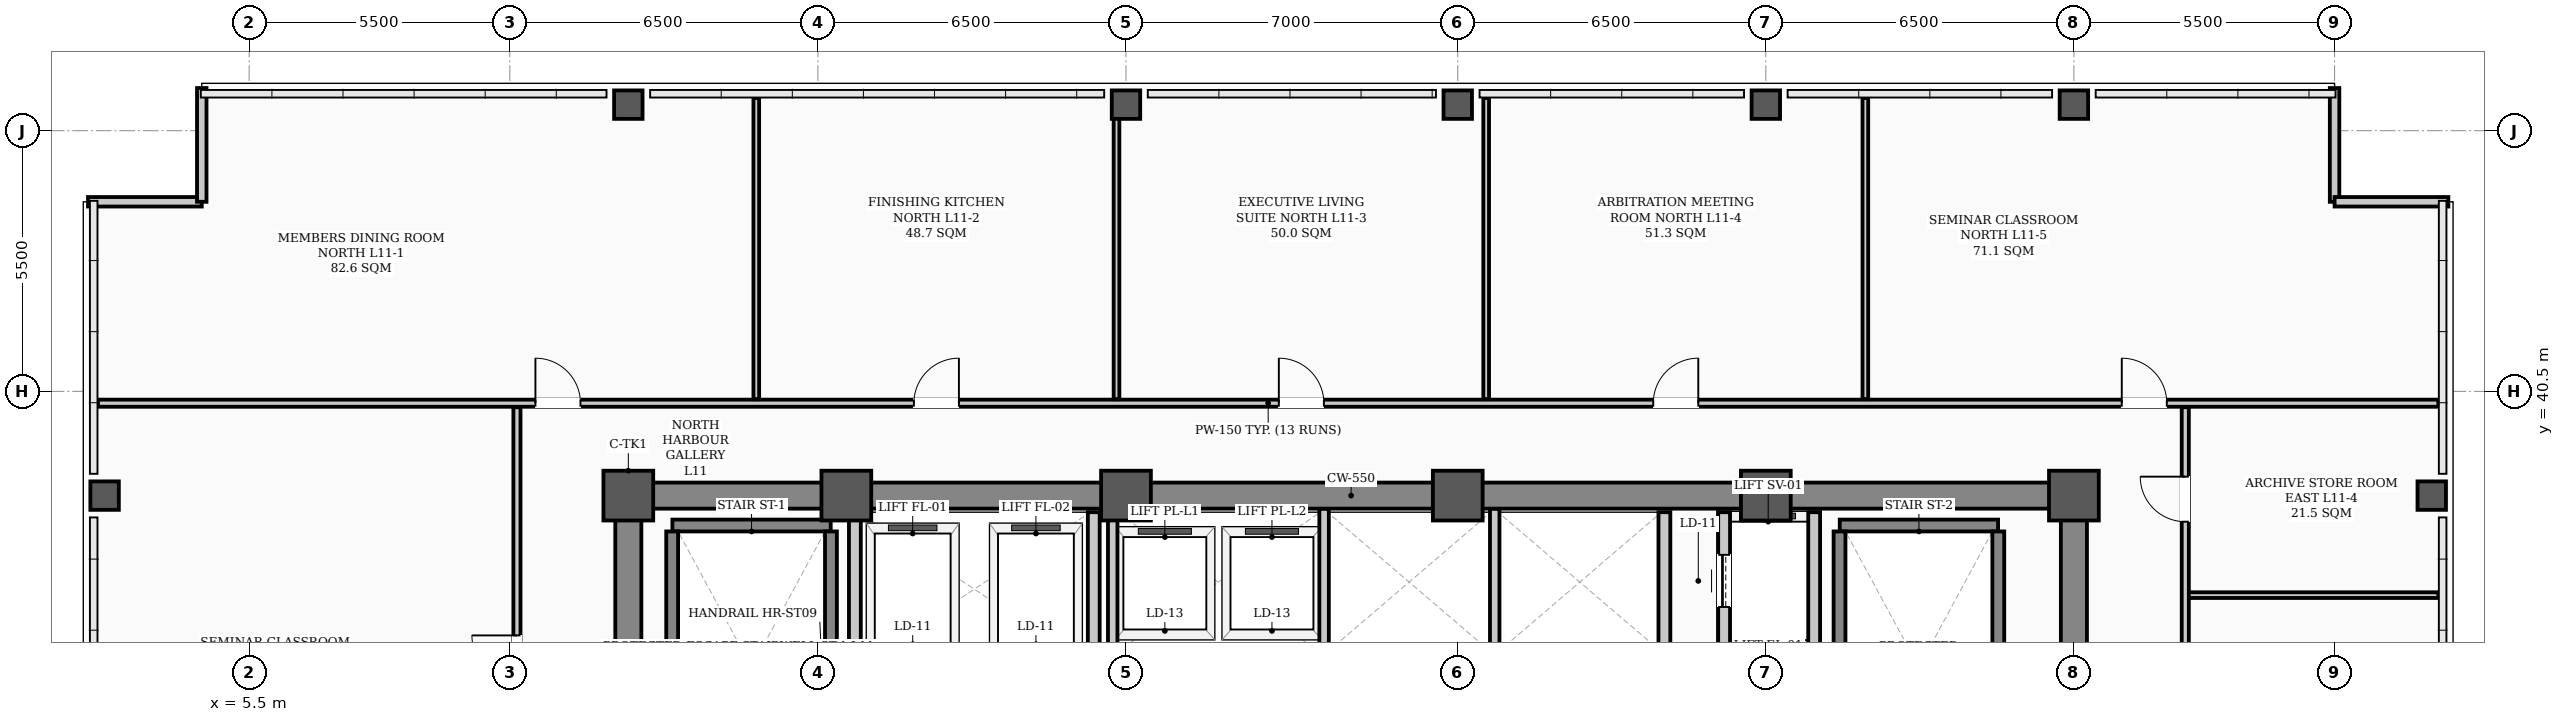
"""IFC4 building model, lengths in metres.
Left out: names, types, materials, properties, quantities, classifications, styles, units other than length and angle.
Written with IfcOpenShell. Run it as: python <this file> out.ifc"""

import sys

from ifc_helpers import new_model, si_unit, direction, frame, frame_2d, origin, origin_2d, place, context, subcontext, project, spatial, rectangle, hollow_rectangle, extrude, element, fill, save


model = new_model("IFC4")
c1 = context("Model", 3, precision=1e-05, world=origin(), true_north=direction((0.0, 1.0)))
c2 = subcontext(c1, "Body", "Model", "MODEL_VIEW")
j1 = project(units=[si_unit("LENGTHUNIT", "METRE"), si_unit("PLANEANGLEUNIT", "RADIAN")], contexts=[c1])
p1 = place(None, origin())
s1 = spatial("IfcSite", under=j1, at=p1, CompositionType="ELEMENT")
p2 = place(p1, origin())
s2 = spatial("IfcBuilding", under=s1, at=p2, CompositionType="ELEMENT")
p3 = place(p2, frame((0.0, 0.0, 46.0)))
s3 = spatial("IfcBuildingStorey", under=s2, at=p3, CompositionType="ELEMENT", Elevation=46.0)
for number, where, z_axis, x_axis in (
    (1, (13.5, 38.3, 0.0), (0.0, 0.0, 1.0), (1.0, 0.0, 0.0)),
    (2, (18.1, 38.3, 0.0), (0.0, 0.0, 1.0), (1.0, 0.0, 0.0)),
    (3, (24.0, 38.3, 0.0), (0.0, 0.0, 1.0), (1.0, 0.0, 0.0)),
    (4, (31.0, 38.3, 0.0), (0.0, 0.0, 1.0), (1.0, 0.0, 0.0)),
    (5, (37.5, 38.3, 0.0), (0.0, 0.0, 1.0), (1.0, 0.0, 0.0)),
    (6, (44.0, 38.3, 0.0), (0.0, 0.0, 1.0), (1.0, 0.0, 0.0)),
):
    element("IfcColumn", number, at=place(p3, frame(where, z_axis=z_axis, x_axis=x_axis)), inside=s3, PredefinedType="COLUMN", context=c2, shape_type="SweptSolid", body=[
        extrude(hollow_rectangle(XDim=1.05, YDim=1.05, WallThickness=0.038, InnerFilletRadius=0.019, OuterFilletRadius=0.057, at=origin_2d()), origin(), (0.0, 0.0, 1.0), 3.9),
    ])
for number, where, z_axis, x_axis in (
    (7, (2.45, 38.3, 0.0), (0.0, 0.0, 1.0), (1.0, 0.0, 0.0)),
    (8, (13.5, 46.55, 0.0), (0.0, 0.0, 1.0), (1.0, 0.0, 0.0)),
    (9, (24.0, 46.55, 0.0), (0.0, 0.0, 1.0), (1.0, 0.0, 0.0)),
    (10, (31.0, 46.55, 0.0), (0.0, 0.0, 1.0), (1.0, 0.0, 0.0)),
    (11, (37.5, 46.55, 0.0), (0.0, 0.0, 1.0), (1.0, 0.0, 0.0)),
    (12, (44.0, 46.55, 0.0), (0.0, 0.0, 1.0), (1.0, 0.0, 0.0)),
    (13, (51.55, 38.3, 0.0), (0.0, 0.0, 1.0), (1.0, 0.0, 0.0)),
):
    element("IfcColumn", number, at=place(p3, frame(where, z_axis=z_axis, x_axis=x_axis)), inside=s3, PredefinedType="COLUMN", context=c2, shape_type="SweptSolid", body=[
        extrude(hollow_rectangle(XDim=0.6, YDim=0.6, WallThickness=0.026, InnerFilletRadius=0.013, OuterFilletRadius=0.039, at=origin_2d()), origin(), (0.0, 0.0, 1.0), 3.9),
    ])
for number, where, z_axis, x_axis in (
    (14, (2.1, 44.5, 0.0), (0.0, 0.0, 1.0), (1.0, 0.0, 0.0)),
    (15, (4.5, 44.5, 0.0), (0.0, 0.0, 1.0), (0.0, 1.0, 0.0)),
    (16, (49.5, 46.9, 0.0), (0.0, 0.0, 1.0), (0.0, -1.0, 0.0)),
    (17, (49.5, 44.5, 0.0), (0.0, 0.0, 1.0), (1.0, 0.0, 0.0)),
):
    element("IfcWall", number, at=place(p3, frame(where, z_axis=z_axis, x_axis=x_axis)), inside=s3, PredefinedType="PARAPET", context=c2, shape_type="SweptSolid", body=[
        extrude(rectangle(XDim=2.4, YDim=0.2, at=frame_2d((1.2, 0.0))), origin(), (0.0, 0.0, 1.0), 1.2),
    ])
p4 = place(p3, frame((13.5, 38.3, 0.0), z_axis=(0.0, 0.0, 1.0), x_axis=(1.0, 0.0, 0.0)))
e18 = element("IfcWall", 18, at=p4, inside=s3, PredefinedType="SHEAR", context=c2, shape_type="SweptSolid", body=[
    extrude(rectangle(XDim=30.5, YDim=0.55, at=frame_2d((15.25, 0.0))), origin(), (0.0, 0.0, 1.0), 3.72),
])
for number, where, z_axis, x_axis in (
    (19, (13.5, 29.35, 0.0), (0.0, 0.0, 1.0), (0.0, 1.0, 0.0)),
    (20, (44.0, 29.35, 0.0), (0.0, 0.0, 1.0), (0.0, 1.0, 0.0)),
):
    element("IfcWall", number, at=place(p3, frame(where, z_axis=z_axis, x_axis=x_axis)), inside=s3, PredefinedType="SHEAR", context=c2, shape_type="SweptSolid", body=[
        extrude(rectangle(XDim=8.6, YDim=0.55, at=frame_2d((4.3, 0.0))), origin(), (0.0, 0.0, 1.0), 3.72),
    ])
p5 = place(p3, frame((14.43, 37.669, 0.0), z_axis=(0.0, 0.0, 1.0), x_axis=(1.0, 0.0, 0.0)))
e21 = element("IfcWall", 21, at=p5, inside=s3, PredefinedType="STANDARD", context=c2, shape_type="SweptSolid", body=[
    extrude(rectangle(XDim=3.34, YDim=0.25, at=frame_2d((1.67, 0.0))), origin(), (0.0, 0.0, 1.0), 3.72),
])
for number, where, z_axis, x_axis in (
    (22, (14.425, 30.36, 0.0), (0.0, 0.0, 1.0), (0.0, 1.0, 0.0)),
    (23, (17.775, 30.36, 0.0), (0.0, 0.0, 1.0), (0.0, 1.0, 0.0)),
):
    element("IfcWall", number, at=place(p3, frame(where, z_axis=z_axis, x_axis=x_axis)), inside=s3, PredefinedType="STANDARD", context=c2, shape_type="SweptSolid", body=[
        extrude(rectangle(XDim=7.184, YDim=0.25, at=frame_2d((3.592, 0.0))), origin(), (0.0, 0.0, 1.0), 3.72),
    ])
p6 = place(p3, frame((39.06, 37.669, 0.0), z_axis=(0.0, 0.0, 1.0), x_axis=(1.0, 0.0, 0.0)))
e24 = element("IfcWall", 24, at=p6, inside=s3, PredefinedType="STANDARD", context=c2, shape_type="SweptSolid", body=[
    extrude(rectangle(XDim=3.34, YDim=0.25, at=frame_2d((1.67, 0.0))), origin(), (0.0, 0.0, 1.0), 3.72),
])
for number, where, z_axis, x_axis in (
    (25, (39.055, 30.36, 0.0), (0.0, 0.0, 1.0), (0.0, 1.0, 0.0)),
    (26, (42.405, 30.36, 0.0), (0.0, 0.0, 1.0), (0.0, 1.0, 0.0)),
):
    element("IfcWall", number, at=place(p3, frame(where, z_axis=z_axis, x_axis=x_axis)), inside=s3, PredefinedType="STANDARD", context=c2, shape_type="SweptSolid", body=[
        extrude(rectangle(XDim=7.184, YDim=0.25, at=frame_2d((3.592, 0.0))), origin(), (0.0, 0.0, 1.0), 3.72),
    ])
p7 = place(p3, frame((36.62, 31.95, 0.0), z_axis=(0.0, 0.0, 1.0), x_axis=(0.0, 1.0, 0.0)))
e27 = element("IfcWall", 27, at=p7, inside=s3, PredefinedType="STANDARD", context=c2, shape_type="SweptSolid", body=[
    extrude(rectangle(XDim=6.0, YDim=0.25, at=frame_2d((3.0, 0.0))), origin(), (0.0, 0.0, 1.0), 3.3),
])
p8 = place(p7, frame((0.9, 0.0, 0.0)))
e28 = element("IfcOpeningElement", 28, at=p8, cuts=e27, PredefinedType="OPENING", context=c2, shape_type="SweptSolid", body=[
    extrude(rectangle(XDim=1.1, YDim=2.08, at=frame_2d((0.55, 1.04))), frame((0.0, 0.135, 0.0), z_axis=(0.0, -1.0, 0.0), x_axis=(1.0, 0.0, 0.0)), (0.0, 0.0, 1.0), 0.27),
])
p9 = place(p7, frame((4.0, 0.0, 0.0)))
e29 = element("IfcOpeningElement", 29, at=p9, cuts=e27, PredefinedType="OPENING", context=c2, shape_type="SweptSolid", body=[
    extrude(rectangle(XDim=1.1, YDim=2.08, at=frame_2d((0.55, 1.04))), frame((0.0, 0.135, 0.0), z_axis=(0.0, -1.0, 0.0), x_axis=(1.0, 0.0, 0.0)), (0.0, 0.0, 1.0), 0.27),
])
p10 = place(p3, frame((38.52, 31.95, 0.0), z_axis=(0.0, 0.0, 1.0), x_axis=(0.0, 1.0, 0.0)))
e30 = element("IfcWall", 30, at=p10, inside=s3, PredefinedType="STANDARD", context=c2, shape_type="SweptSolid", body=[
    extrude(rectangle(XDim=6.0, YDim=0.25, at=frame_2d((3.0, 0.0))), origin(), (0.0, 0.0, 1.0), 3.3),
])
for number, where, z_axis, x_axis in (
    (31, (18.28, 34.62, 0.0), (0.0, 0.0, 1.0), (0.0, 1.0, 0.0)),
    (32, (23.32, 34.62, 0.0), (0.0, 0.0, 1.0), (0.0, 1.0, 0.0)),
):
    element("IfcWall", number, at=place(p3, frame(where, z_axis=z_axis, x_axis=x_axis)), inside=s3, PredefinedType="STANDARD", context=c2, shape_type="SweptSolid", body=[
        extrude(rectangle(XDim=3.33, YDim=0.25, at=frame_2d((1.665, 0.0))), origin(), (0.0, 0.0, 1.0), 3.3),
    ])
p11 = place(p3, frame((35.36, 34.9, 0.0), z_axis=(0.0, 0.0, 1.0), x_axis=(0.0, 1.0, 0.0)))
e33 = element("IfcWall", 33, at=p11, inside=s3, PredefinedType="STANDARD", context=c2, shape_type="SweptSolid", body=[
    extrude(rectangle(XDim=3.05, YDim=0.25, at=frame_2d((1.525, 0.0))), origin(), (0.0, 0.0, 1.0), 3.3),
])
p12 = place(p3, frame((46.35, 36.2, 0.0), z_axis=(0.0, 0.0, 1.0), x_axis=(1.0, 0.0, 0.0)))
e34 = element("IfcWall", 34, at=p12, inside=s3, PredefinedType="PARTITIONING", context=c2, shape_type="SweptSolid", body=[
    extrude(rectangle(XDim=5.34, YDim=0.12, at=frame_2d((2.67, 0.0))), origin(), (0.0, 0.0, 1.0), 3.212),
])
p13 = place(p3, frame((2.31, 40.25, 0.0), z_axis=(0.0, 0.0, 1.0), x_axis=(1.0, 0.0, 0.0)))
e35 = element("IfcWall", 35, at=p13, inside=s3, PredefinedType="PARTITIONING", context=c2, shape_type="SweptSolid", body=[
    extrude(rectangle(XDim=49.38, YDim=0.15, at=frame_2d((24.69, 0.0))), origin(), (0.0, 0.0, 1.0), 3.1),
])
p14 = place(p13, frame((9.23, 0.0, 0.0)))
e36 = element("IfcOpeningElement", 36, at=p14, cuts=e35, PredefinedType="OPENING", context=c2, shape_type="SweptSolid", body=[
    extrude(rectangle(XDim=0.95, YDim=2.08, at=frame_2d((0.475, 1.04))), frame((0.0, 0.085, 0.0), z_axis=(0.0, -1.0, 0.0), x_axis=(1.0, 0.0, 0.0)), (0.0, 0.0, 1.0), 0.17),
])
p15 = place(p13, frame((17.215, 0.0, 0.0)))
e37 = element("IfcOpeningElement", 37, at=p15, cuts=e35, PredefinedType="OPENING", context=c2, shape_type="SweptSolid", body=[
    extrude(rectangle(XDim=0.95, YDim=2.08, at=frame_2d((0.475, 1.04))), frame((0.0, 0.085, 0.0), z_axis=(0.0, -1.0, 0.0), x_axis=(1.0, 0.0, 0.0)), (0.0, 0.0, 1.0), 0.17),
])
p16 = place(p13, frame((24.915, 0.0, 0.0)))
e38 = element("IfcOpeningElement", 38, at=p16, cuts=e35, PredefinedType="OPENING", context=c2, shape_type="SweptSolid", body=[
    extrude(rectangle(XDim=0.95, YDim=2.08, at=frame_2d((0.475, 1.04))), frame((0.0, 0.085, 0.0), z_axis=(0.0, -1.0, 0.0), x_axis=(1.0, 0.0, 0.0)), (0.0, 0.0, 1.0), 0.17),
])
p17 = place(p13, frame((32.815, 0.0, 0.0)))
e39 = element("IfcOpeningElement", 39, at=p17, cuts=e35, PredefinedType="OPENING", context=c2, shape_type="SweptSolid", body=[
    extrude(rectangle(XDim=0.95, YDim=2.08, at=frame_2d((0.475, 1.04))), frame((0.0, 0.085, 0.0), z_axis=(0.0, -1.0, 0.0), x_axis=(1.0, 0.0, 0.0)), (0.0, 0.0, 1.0), 0.17),
])
p18 = place(p13, frame((42.7, 0.0, 0.0)))
e40 = element("IfcOpeningElement", 40, at=p18, cuts=e35, PredefinedType="OPENING", context=c2, shape_type="SweptSolid", body=[
    extrude(rectangle(XDim=0.95, YDim=2.08, at=frame_2d((0.475, 1.04))), frame((0.0, 0.085, 0.0), z_axis=(0.0, -1.0, 0.0), x_axis=(1.0, 0.0, 0.0)), (0.0, 0.0, 1.0), 0.17),
])
p19 = place(p3, frame((11.15, 17.635, 0.0), z_axis=(0.0, 0.0, 1.0), x_axis=(0.0, 1.0, 0.0)))
e41 = element("IfcWall", 41, at=p19, inside=s3, PredefinedType="PARTITIONING", context=c2, shape_type="SweptSolid", body=[
    extrude(rectangle(XDim=22.53, YDim=0.15, at=frame_2d((11.265, 0.0))), origin(), (0.0, 0.0, 1.0), 3.0),
])
p20 = place(p19, frame((5.415, 0.0, 0.0)))
e42 = element("IfcOpeningElement", 42, at=p20, cuts=e41, PredefinedType="OPENING", context=c2, shape_type="SweptSolid", body=[
    extrude(rectangle(XDim=0.95, YDim=2.08, at=frame_2d((0.475, 1.04))), frame((0.0, 0.085, 0.0), z_axis=(0.0, -1.0, 0.0), x_axis=(1.0, 0.0, 0.0)), (0.0, 0.0, 1.0), 0.17),
])
p21 = place(p19, frame((16.765, 0.0, 0.0)))
e43 = element("IfcOpeningElement", 43, at=p21, cuts=e41, PredefinedType="OPENING", context=c2, shape_type="SweptSolid", body=[
    extrude(rectangle(XDim=0.95, YDim=2.08, at=frame_2d((0.475, 1.04))), frame((0.0, 0.085, 0.0), z_axis=(0.0, -1.0, 0.0), x_axis=(1.0, 0.0, 0.0)), (0.0, 0.0, 1.0), 0.17),
])
p22 = place(p3, frame((46.35, 17.635, 0.0), z_axis=(0.0, 0.0, 1.0), x_axis=(0.0, 1.0, 0.0)))
e44 = element("IfcWall", 44, at=p22, inside=s3, PredefinedType="PARTITIONING", context=c2, shape_type="SweptSolid", body=[
    extrude(rectangle(XDim=22.53, YDim=0.15, at=frame_2d((11.265, 0.0))), origin(), (0.0, 0.0, 1.0), 3.0),
])
p23 = place(p22, frame((3.465, 0.0, 0.0)))
e45 = element("IfcOpeningElement", 45, at=p23, cuts=e44, PredefinedType="OPENING", context=c2, shape_type="SweptSolid", body=[
    extrude(rectangle(XDim=0.95, YDim=2.08, at=frame_2d((0.475, 1.04))), frame((0.0, 0.085, 0.0), z_axis=(0.0, -1.0, 0.0), x_axis=(1.0, 0.0, 0.0)), (0.0, 0.0, 1.0), 0.17),
])
p24 = place(p22, frame((8.69, 0.0, 0.0)))
e46 = element("IfcOpeningElement", 46, at=p24, cuts=e44, PredefinedType="OPENING", context=c2, shape_type="SweptSolid", body=[
    extrude(rectangle(XDim=0.95, YDim=2.08, at=frame_2d((0.475, 1.04))), frame((0.0, 0.085, 0.0), z_axis=(0.0, -1.0, 0.0), x_axis=(1.0, 0.0, 0.0)), (0.0, 0.0, 1.0), 0.17),
])
p25 = place(p22, frame((15.69, 0.0, 0.0)))
e47 = element("IfcOpeningElement", 47, at=p25, cuts=e44, PredefinedType="OPENING", context=c2, shape_type="SweptSolid", body=[
    extrude(rectangle(XDim=0.95, YDim=2.08, at=frame_2d((0.475, 1.04))), frame((0.0, 0.085, 0.0), z_axis=(0.0, -1.0, 0.0), x_axis=(1.0, 0.0, 0.0)), (0.0, 0.0, 1.0), 0.17),
])
p26 = place(p22, frame((20.115, 0.0, 0.0)))
e48 = element("IfcOpeningElement", 48, at=p26, cuts=e44, PredefinedType="OPENING", context=c2, shape_type="SweptSolid", body=[
    extrude(rectangle(XDim=0.95, YDim=2.08, at=frame_2d((0.475, 1.04))), frame((0.0, 0.085, 0.0), z_axis=(0.0, -1.0, 0.0), x_axis=(1.0, 0.0, 0.0)), (0.0, 0.0, 1.0), 0.17),
])
p27 = place(p3, frame((16.2, 40.335, 0.0), z_axis=(0.0, 0.0, 1.0), x_axis=(0.0, 1.0, 0.0)))
e49 = element("IfcWall", 49, at=p27, inside=s3, PredefinedType="PARTITIONING", context=c2, shape_type="SweptSolid", body=[
    extrude(rectangle(XDim=6.355, YDim=0.12, at=frame_2d((3.177, 0.0))), origin(), (0.0, 0.0, 1.0), 3.212),
])
for number, where, z_axis, x_axis in (
    (50, (23.8, 40.335, 0.0), (0.0, 0.0, 1.0), (0.0, 1.0, 0.0)),
    (51, (31.6, 40.335, 0.0), (0.0, 0.0, 1.0), (0.0, 1.0, 0.0)),
):
    element("IfcWall", number, at=place(p3, frame(where, z_axis=z_axis, x_axis=x_axis)), inside=s3, PredefinedType="PARTITIONING", context=c2, shape_type="SweptSolid", body=[
        extrude(rectangle(XDim=6.355, YDim=0.12, at=frame_2d((3.177, 0.0))), origin(), (0.0, 0.0, 1.0), 3.1),
    ])
p28 = place(p3, frame((39.6, 40.335, 0.0), z_axis=(0.0, 0.0, 1.0), x_axis=(0.0, 1.0, 0.0)))
e52 = element("IfcWall", 52, at=p28, inside=s3, PredefinedType="PARTITIONING", context=c2, shape_type="SweptSolid", body=[
    extrude(rectangle(XDim=6.355, YDim=0.12, at=frame_2d((3.177, 0.0))), origin(), (0.0, 0.0, 1.0), 3.212),
])
p29 = place(p3, frame((23.72, 34.9, 0.0), z_axis=(0.0, 0.0, 1.0), x_axis=(0.0, 1.0, 0.0)))
e53 = element("IfcWall", 53, at=p29, inside=s3, PredefinedType="STANDARD", context=c2, shape_type="SweptSolid", body=[
    extrude(rectangle(XDim=3.12, YDim=0.2, at=frame_2d((1.56, 0.0))), origin(), (0.0, 0.0, 1.0), 3.1),
])
for number, where, z_axis, x_axis in (
    (54, (28.18, 34.9, 0.0), (0.0, 0.0, 1.0), (0.0, 1.0, 0.0)),
    (55, (31.78, 34.9, 0.0), (0.0, 0.0, 1.0), (0.0, 1.0, 0.0)),
):
    element("IfcWall", number, at=place(p3, frame(where, z_axis=z_axis, x_axis=x_axis)), inside=s3, PredefinedType="STANDARD", context=c2, shape_type="SweptSolid", body=[
        extrude(rectangle(XDim=3.12, YDim=0.2, at=frame_2d((1.56, 0.0))), origin(), (0.0, 0.0, 1.0), 3.3),
    ])
p30 = place(p21, origin())
e56 = element("IfcDoor", 56, at=p30, inside=s3, OperationType="SINGLE_SWING_RIGHT", PredefinedType="DOOR", context=c2, shape_type="SweptSolid", body=[
    extrude(rectangle(XDim=0.95, YDim=2.08, at=frame_2d((0.475, 1.04))), frame((0.0, 0.025, 0.0), z_axis=(0.0, -1.0, 0.0), x_axis=(1.0, 0.0, 0.0)), (0.0, 0.0, 1.0), 0.05),
])
fill(e43, e56)
p31 = place(p26, origin())
e57 = element("IfcDoor", 57, at=p31, inside=s3, OperationType="SINGLE_SWING_RIGHT", PredefinedType="DOOR", context=c2, shape_type="SweptSolid", body=[
    extrude(rectangle(XDim=0.95, YDim=2.08, at=frame_2d((0.475, 1.04))), frame((0.0, 0.025, 0.0), z_axis=(0.0, -1.0, 0.0), x_axis=(1.0, 0.0, 0.0)), (0.0, 0.0, 1.0), 0.05),
])
fill(e48, e57)
p32 = place(p14, origin())
e58 = element("IfcDoor", 58, at=p32, inside=s3, OperationType="SINGLE_SWING_LEFT", PredefinedType="DOOR", context=c2, shape_type="SweptSolid", body=[
    extrude(rectangle(XDim=0.95, YDim=2.08, at=frame_2d((0.475, 1.04))), frame((0.0, 0.025, 0.0), z_axis=(0.0, -1.0, 0.0), x_axis=(1.0, 0.0, 0.0)), (0.0, 0.0, 1.0), 0.05),
])
fill(e36, e58)
p33 = place(p15, origin())
e59 = element("IfcDoor", 59, at=p33, inside=s3, OperationType="SINGLE_SWING_RIGHT", PredefinedType="DOOR", context=c2, shape_type="SweptSolid", body=[
    extrude(rectangle(XDim=0.95, YDim=2.08, at=frame_2d((0.475, 1.04))), frame((0.0, 0.025, 0.0), z_axis=(0.0, -1.0, 0.0), x_axis=(1.0, 0.0, 0.0)), (0.0, 0.0, 1.0), 0.05),
])
fill(e37, e59)
p34 = place(p16, origin())
e60 = element("IfcDoor", 60, at=p34, inside=s3, OperationType="SINGLE_SWING_LEFT", PredefinedType="DOOR", context=c2, shape_type="SweptSolid", body=[
    extrude(rectangle(XDim=0.95, YDim=2.08, at=frame_2d((0.475, 1.04))), frame((0.0, 0.025, 0.0), z_axis=(0.0, -1.0, 0.0), x_axis=(1.0, 0.0, 0.0)), (0.0, 0.0, 1.0), 0.05),
])
fill(e38, e60)
p35 = place(p17, origin())
e61 = element("IfcDoor", 61, at=p35, inside=s3, OperationType="SINGLE_SWING_RIGHT", PredefinedType="DOOR", context=c2, shape_type="SweptSolid", body=[
    extrude(rectangle(XDim=0.95, YDim=2.08, at=frame_2d((0.475, 1.04))), frame((0.0, 0.025, 0.0), z_axis=(0.0, -1.0, 0.0), x_axis=(1.0, 0.0, 0.0)), (0.0, 0.0, 1.0), 0.05),
])
fill(e39, e61)
p36 = place(p18, origin())
e62 = element("IfcDoor", 62, at=p36, inside=s3, OperationType="SINGLE_SWING_LEFT", PredefinedType="DOOR", context=c2, shape_type="SweptSolid", body=[
    extrude(rectangle(XDim=0.95, YDim=2.08, at=frame_2d((0.475, 1.04))), frame((0.0, 0.025, 0.0), z_axis=(0.0, -1.0, 0.0), x_axis=(1.0, 0.0, 0.0)), (0.0, 0.0, 1.0), 0.05),
])
fill(e40, e62)
p37 = place(p9, origin())
e63 = element("IfcDoor", 63, at=p37, inside=s3, OperationType="SLIDING_TO_LEFT", PredefinedType="DOOR", context=c2, shape_type="SweptSolid", body=[
    extrude(rectangle(XDim=1.1, YDim=2.08, at=frame_2d((0.55, 1.04))), frame((0.0, 0.025, 0.0), z_axis=(0.0, -1.0, 0.0), x_axis=(1.0, 0.0, 0.0)), (0.0, 0.0, 1.0), 0.05),
])
fill(e29, e63)
save(model, sys.argv[1])
